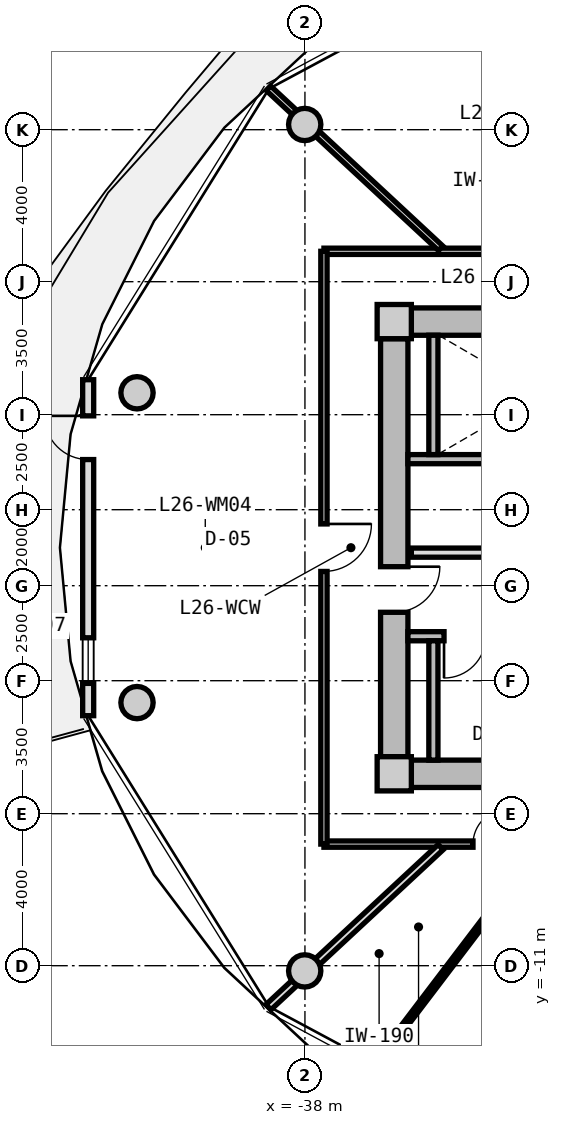
"""IFC4 building model, lengths in metres.
Left out: names, types, materials, properties, quantities, classifications, styles, units other than length and angle.
Written with IfcOpenShell. Run it as: python <this file> out.ifc"""

import sys

from ifc_helpers import new_model, si_unit, direction, frame, frame_2d, origin, origin_2d, place, context, subcontext, project, spatial, rectangle, circle, extrude, source, transform, mapped, element, fill, save


model = new_model("IFC4")
c1 = context("Model", 3, precision=1e-05, world=origin(), true_north=direction((0.0, 1.0)))
c2 = subcontext(c1, "Body", "Model", "MODEL_VIEW")
j1 = project(units=[si_unit("LENGTHUNIT", "METRE"), si_unit("PLANEANGLEUNIT", "RADIAN")], contexts=[c1])
p1 = place(None, origin())
s1 = spatial("IfcSite", under=j1, at=p1, CompositionType="ELEMENT")
p2 = place(p1, origin())
s2 = spatial("IfcBuilding", under=s1, at=p2, CompositionType="ELEMENT")
p3 = place(p2, frame((0.0, 0.0, 87.1)))
s3 = spatial("IfcBuildingStorey", under=s2, at=p3, CompositionType="ELEMENT", Elevation=87.1)
m1 = source(origin(), c2, "Body", "SweptSolid", [
    extrude(rectangle(XDim=0.9, YDim=0.9, at=origin_2d()), origin(), (0.0, 0.0, 1.0), 3.05),
])
for number, where, z_axis, x_axis in (
    (1, (-35.65, -5.95, 0.0), (0.0, 0.0, 1.0), (1.0, 0.0, 0.0)),
    (2, (-35.65, 5.95, 0.0), (0.0, 0.0, 1.0), (1.0, 0.0, 0.0)),
):
    element("IfcColumn", number, at=place(p3, frame(where, z_axis=z_axis, x_axis=x_axis)), inside=s3, PredefinedType="COLUMN", context=c2, shape_type="MappedRepresentation", body=[
        mapped(m1, transform((0.0, 0.0, 0.0), x_axis=(1.0, 0.0, 0.0), y_axis=(0.0, 1.0, 0.0), z_axis=(0.0, 0.0, 1.0), scale=1.0)),
    ])
m2 = source(origin(), c2, "Body", "SweptSolid", [
    extrude(rectangle(XDim=14.4, YDim=0.72, at=frame_2d((7.2, 0.0))), origin(), (0.0, 0.0, 1.0), 2.79),
])
for number, where, z_axis, x_axis in (
    (3, (-35.2, 5.95, 0.0), (0.0, 0.0, 1.0), (1.0, 0.0, 0.0)),
    (4, (-20.8, -5.95, 0.0), (0.0, 0.0, 1.0), (-1.0, 0.0, 0.0)),
):
    element("IfcWall", number, at=place(p3, frame(where, z_axis=z_axis, x_axis=x_axis)), inside=s3, PredefinedType="SHEAR", context=c2, shape_type="MappedRepresentation", body=[
        mapped(m2, transform((0.0, 0.0, 0.0), x_axis=(1.0, 0.0, 0.0), y_axis=(0.0, 1.0, 0.0), z_axis=(0.0, 0.0, 1.0), scale=1.0)),
    ])
m3 = source(origin(), c2, "Body", "SweptSolid", [
    extrude(rectangle(XDim=11.0, YDim=0.72, at=frame_2d((5.5, 0.0))), origin(), (0.0, 0.0, 1.0), 2.79),
])
p4 = place(p3, frame((-35.65, -5.5, 0.0), z_axis=(0.0, 0.0, 1.0), x_axis=(0.0, 1.0, 0.0)))
e5 = element("IfcWall", 5, at=p4, inside=s3, PredefinedType="SHEAR", context=c2, shape_type="MappedRepresentation", body=[
    mapped(m3, transform((0.0, 0.0, 0.0), x_axis=(1.0, 0.0, 0.0), y_axis=(0.0, 1.0, 0.0), z_axis=(0.0, 0.0, 1.0), scale=1.0)),
])
p5 = place(p4, frame((3.8, 0.0, 0.0)))
e6 = element("IfcOpeningElement", 6, at=p5, cuts=e5, PredefinedType="OPENING", context=c2, shape_type="SweptSolid", body=[
    extrude(rectangle(XDim=1.2, YDim=2.15, at=frame_2d((0.6, 1.075))), frame((0.0, 0.37, 0.0), z_axis=(0.0, -1.0, 0.0), x_axis=(1.0, 0.0, 0.0)), (0.0, 0.0, 1.0), 0.74),
])
m4 = source(origin(), c2, "Body", "SweptSolid", [
    extrude(circle(Radius=0.425, at=origin_2d()), origin(), (0.0, 0.0, 1.0), 3.05),
])
for number, where, z_axis, x_axis in (
    (7, (-38.006, 11.137, 0.0), (0.0, 0.0, 1.0), (1.0, 0.0, 0.0)),
    (8, (-42.419, 4.076, 0.0), (0.0, 0.0, 1.0), (1.0, 0.0, 0.0)),
    (9, (-42.419, -4.076, 0.0), (0.0, 0.0, 1.0), (1.0, 0.0, 0.0)),
    (10, (-38.006, -11.137, 0.0), (0.0, 0.0, 1.0), (1.0, 0.0, 0.0)),
):
    element("IfcColumn", number, at=place(p3, frame(where, z_axis=z_axis, x_axis=x_axis)), inside=s3, PredefinedType="COLUMN", context=c2, shape_type="MappedRepresentation", body=[
        mapped(m4, transform((0.0, 0.0, 0.0), x_axis=(1.0, 0.0, 0.0), y_axis=(0.0, 1.0, 0.0), z_axis=(0.0, 0.0, 1.0), scale=1.0)),
    ])
m5 = source(origin(), c2, "Body", "SweptSolid", [
    extrude(rectangle(XDim=8.841, YDim=0.29, at=frame_2d((4.421, 0.0))), origin(), (0.0, 0.0, 1.0), 2.79),
])
p6 = place(p3, frame((-43.704, -4.421, 0.0), z_axis=(0.0, 0.0, 1.0), x_axis=(0.0, 1.0, 0.0)))
e11 = element("IfcWall", 11, at=p6, inside=s3, PredefinedType="SOLIDWALL", context=c2, shape_type="MappedRepresentation", body=[
    mapped(m5, transform((0.0, 0.0, 0.0), x_axis=(1.0, 0.0, 0.0), y_axis=(0.0, 1.0, 0.0), z_axis=(0.0, 0.0, 1.0), scale=1.0)),
])
p7 = place(p6, frame((6.74, 0.0, 0.0)))
e12 = element("IfcOpeningElement", 12, at=p7, cuts=e11, PredefinedType="OPENING", context=c2, shape_type="SweptSolid", body=[
    extrude(rectangle(XDim=1.15, YDim=2.25, at=frame_2d((0.575, 1.125))), frame((0.0, 0.155, 0.0), z_axis=(0.0, -1.0, 0.0), x_axis=(1.0, 0.0, 0.0)), (0.0, 0.0, 1.0), 0.31),
])
p8 = place(p6, frame((0.85, 0.0, 0.85)))
e13 = element("IfcOpeningElement", 13, at=p8, cuts=e11, PredefinedType="OPENING", context=c2, shape_type="SweptSolid", body=[
    extrude(rectangle(XDim=1.2, YDim=1.5, at=frame_2d((0.6, 0.75))), frame((0.0, 0.155, 0.0), z_axis=(0.0, -1.0, 0.0), x_axis=(1.0, 0.0, 0.0)), (0.0, 0.0, 1.0), 0.31),
])
m6 = source(origin(), c2, "Body", "SweptSolid", [
    extrude(rectangle(XDim=7.83, YDim=0.24, at=frame_2d((3.915, 0.0))), origin(), (0.0, 0.0, 1.0), 2.79),
])
p9 = place(p3, frame((-35.29, 2.33, 0.0), z_axis=(0.0, 0.0, 1.0), x_axis=(1.0, 0.0, 0.0)))
e14 = element("IfcWall", 14, at=p9, inside=s3, PredefinedType="PARTITIONING", context=c2, shape_type="MappedRepresentation", body=[
    mapped(m6, transform((0.0, 0.0, 0.0), x_axis=(1.0, 0.0, 0.0), y_axis=(0.0, 1.0, 0.0), z_axis=(0.0, 0.0, 1.0), scale=1.0)),
])
m7 = source(origin(), c2, "Body", "SweptSolid", [
    extrude(rectangle(XDim=3.14, YDim=0.24, at=frame_2d((1.57, 0.0))), origin(), (0.0, 0.0, 1.0), 2.79),
])
p10 = place(p3, frame((-34.62, 2.45, 0.0), z_axis=(0.0, 0.0, 1.0), x_axis=(0.0, 1.0, 0.0)))
e15 = element("IfcWall", 15, at=p10, inside=s3, PredefinedType="PARTITIONING", context=c2, shape_type="MappedRepresentation", body=[
    mapped(m7, transform((0.0, 0.0, 0.0), x_axis=(1.0, 0.0, 0.0), y_axis=(0.0, 1.0, 0.0), z_axis=(0.0, 0.0, 1.0), scale=1.0)),
])
p11 = place(p3, frame((-35.29, -2.33, 0.0), z_axis=(0.0, 0.0, 1.0), x_axis=(1.0, 0.0, 0.0)))
e16 = element("IfcWall", 16, at=p11, inside=s3, PredefinedType="PARTITIONING", context=c2, shape_type="MappedRepresentation", body=[
    mapped(m6, transform((0.0, 0.0, 0.0), x_axis=(1.0, 0.0, 0.0), y_axis=(0.0, 1.0, 0.0), z_axis=(0.0, 0.0, 1.0), scale=1.0)),
])
p12 = place(p11, frame((0.95, 0.0, 0.0)))
e17 = element("IfcOpeningElement", 17, at=p12, cuts=e16, PredefinedType="OPENING", context=c2, shape_type="SweptSolid", body=[
    extrude(rectangle(XDim=1.1, YDim=2.15, at=frame_2d((0.55, 1.075))), frame((0.0, 0.13, 0.0), z_axis=(0.0, -1.0, 0.0), x_axis=(1.0, 0.0, 0.0)), (0.0, 0.0, 1.0), 0.26),
])
p13 = place(p3, frame((-34.62, -5.59, 0.0), z_axis=(0.0, 0.0, 1.0), x_axis=(0.0, 1.0, 0.0)))
e18 = element("IfcWall", 18, at=p13, inside=s3, PredefinedType="PARTITIONING", context=c2, shape_type="MappedRepresentation", body=[
    mapped(m7, transform((0.0, 0.0, 0.0), x_axis=(1.0, 0.0, 0.0), y_axis=(0.0, 1.0, 0.0), z_axis=(0.0, 0.0, 1.0), scale=1.0)),
])
m8 = source(origin(), c2, "Body", "SweptSolid", [
    extrude(rectangle(XDim=7.62, YDim=0.24, at=frame_2d((3.81, 0.0))), origin(), (0.0, 0.0, 1.0), 2.775),
])
p14 = place(p3, frame((-35.2, -0.13, 0.0), z_axis=(0.0, 0.0, 1.0), x_axis=(1.0, 0.0, 0.0)))
e19 = element("IfcWall", 19, at=p14, inside=s3, PredefinedType="PARTITIONING", context=c2, shape_type="MappedRepresentation", body=[
    mapped(m8, transform((0.0, 0.0, 0.0), x_axis=(1.0, 0.0, 0.0), y_axis=(0.0, 1.0, 0.0), z_axis=(0.0, 0.0, 1.0), scale=1.0)),
])
p15 = place(p14, frame((6.22, 0.0, 0.0)))
e20 = element("IfcOpeningElement", 20, at=p15, cuts=e19, PredefinedType="OPENING", context=c2, shape_type="SweptSolid", body=[
    extrude(rectangle(XDim=1.0, YDim=2.1, at=frame_2d((0.5, 1.05))), frame((0.0, 0.13, 0.0), z_axis=(0.0, -1.0, 0.0), x_axis=(1.0, 0.0, 0.0)), (0.0, 0.0, 1.0), 0.26),
])
p16 = place(p14, frame((2.4, 0.0, 0.0)))
e21 = element("IfcOpeningElement", 21, at=p16, cuts=e19, PredefinedType="OPENING", context=c2, shape_type="SweptSolid", body=[
    extrude(rectangle(XDim=1.0, YDim=2.1, at=frame_2d((0.5, 1.05))), frame((0.0, 0.13, 0.0), z_axis=(0.0, -1.0, 0.0), x_axis=(1.0, 0.0, 0.0)), (0.0, 0.0, 1.0), 0.26),
])
m9 = source(origin(), c2, "Body", "SweptSolid", [
    extrude(rectangle(XDim=8.6, YDim=0.165, at=frame_2d((4.3, 0.0))), origin(), (0.0, 0.0, 1.0), 2.775),
])
p17 = place(p3, frame((-37.5, 7.8, 0.0), z_axis=(0.0, 0.0, 1.0), x_axis=(1.0, 0.0, 0.0)))
e22 = element("IfcWall", 22, at=p17, inside=s3, PredefinedType="PARTITIONING", context=c2, shape_type="MappedRepresentation", body=[
    mapped(m9, transform((0.0, 0.0, 0.0), x_axis=(1.0, 0.0, 0.0), y_axis=(0.0, 1.0, 0.0), z_axis=(0.0, 0.0, 1.0), scale=1.0)),
])
m10 = source(origin(), c2, "Body", "SweptSolid", [
    extrude(rectangle(XDim=9.234, YDim=0.165, at=frame_2d((4.617, 0.0))), origin(), (0.0, 0.0, 1.0), 2.775),
])
p18 = place(p3, frame((-28.266, -7.8, 0.0), z_axis=(0.0, 0.0, 1.0), x_axis=(-1.0, 0.0, 0.0)))
e23 = element("IfcWall", 23, at=p18, inside=s3, PredefinedType="PARTITIONING", context=c2, shape_type="MappedRepresentation", body=[
    mapped(m10, transform((0.0, 0.0, 0.0), x_axis=(1.0, 0.0, 0.0), y_axis=(0.0, 1.0, 0.0), z_axis=(0.0, 0.0, 1.0), scale=1.0)),
])
p19 = place(p18, frame((4.392, 0.0, 0.0)))
e24 = element("IfcOpeningElement", 24, at=p19, cuts=e23, PredefinedType="OPENING", context=c2, shape_type="SweptSolid", body=[
    extrude(rectangle(XDim=0.92, YDim=2.1, at=frame_2d((0.46, 1.05))), frame((0.0, 0.093, 0.0), z_axis=(0.0, -1.0, 0.0), x_axis=(1.0, 0.0, 0.0)), (0.0, 0.0, 1.0), 0.185),
])
p20 = place(p18, frame((1.408, 0.0, 0.0)))
e25 = element("IfcOpeningElement", 25, at=p20, cuts=e23, PredefinedType="OPENING", context=c2, shape_type="SweptSolid", body=[
    extrude(rectangle(XDim=0.92, YDim=2.1, at=frame_2d((0.46, 1.05))), frame((0.0, 0.093, 0.0), z_axis=(0.0, -1.0, 0.0), x_axis=(1.0, 0.0, 0.0)), (0.0, 0.0, 1.0), 0.185),
])
m11 = source(origin(), c2, "Body", "SweptSolid", [
    extrude(rectangle(XDim=15.6, YDim=0.165, at=frame_2d((7.8, 0.0))), origin(), (0.0, 0.0, 1.0), 2.775),
])
p21 = place(p3, frame((-37.5, -7.8, 0.0), z_axis=(0.0, 0.0, 1.0), x_axis=(0.0, 1.0, 0.0)))
e26 = element("IfcWall", 26, at=p21, inside=s3, PredefinedType="PARTITIONING", context=c2, shape_type="MappedRepresentation", body=[
    mapped(m11, transform((0.0, 0.0, 0.0), x_axis=(1.0, 0.0, 0.0), y_axis=(0.0, 1.0, 0.0), z_axis=(0.0, 0.0, 1.0), scale=1.0)),
])
p22 = place(p21, frame((7.175, 0.0, 0.0)))
e27 = element("IfcOpeningElement", 27, at=p22, cuts=e26, PredefinedType="OPENING", context=c2, shape_type="SweptSolid", body=[
    extrude(rectangle(XDim=1.25, YDim=2.2, at=frame_2d((0.625, 1.1))), frame((0.0, 0.093, 0.0), z_axis=(0.0, -1.0, 0.0), x_axis=(1.0, 0.0, 0.0)), (0.0, 0.0, 1.0), 0.185),
])
m12 = source(origin(), c2, "Body", "SweptSolid", [
    extrude(rectangle(XDim=6.187, YDim=0.165, at=frame_2d((3.093, 0.0))), origin(), (0.0, 0.0, 1.0), 2.275),
])
p23 = place(p3, frame((-34.429, 7.88, 0.0), z_axis=(0.0, 0.0, 1.0), x_axis=(-0.732501077882, 0.680765870841, 0.0)))
e28 = element("IfcWall", 28, at=p23, inside=s3, PredefinedType="PARTITIONING", context=c2, shape_type="MappedRepresentation", body=[
    mapped(m12, transform((0.0, 0.0, 0.0), x_axis=(1.0, 0.0, 0.0), y_axis=(0.0, 1.0, 0.0), z_axis=(0.0, 0.0, 1.0), scale=1.0)),
])
m13 = source(origin(), c2, "Body", "SweptSolid", [
    extrude(rectangle(XDim=6.187, YDim=0.19, at=frame_2d((3.093, 0.0))), origin(), (0.0, 0.0, 1.0), 2.275),
])
p24 = place(p3, frame((-34.429, -7.88, 0.0), z_axis=(0.0, 0.0, 1.0), x_axis=(-0.732501077882, -0.680765870841, 0.0)))
e29 = element("IfcWall", 29, at=p24, inside=s3, PredefinedType="PARTITIONING", context=c2, shape_type="MappedRepresentation", body=[
    mapped(m13, transform((0.0, 0.0, 0.0), x_axis=(1.0, 0.0, 0.0), y_axis=(0.0, 1.0, 0.0), z_axis=(0.0, 0.0, 1.0), scale=1.0)),
])
m14 = source(origin(), c2, "Body", "SweptSolid", [
    extrude(rectangle(XDim=7.243, YDim=0.14, at=frame_2d((3.621, 0.0))), origin(), (0.0, 0.0, 1.0), 2.775),
])
p25 = place(p3, frame((-31.774, -7.83, 0.0), z_axis=(0.0, 0.0, 1.0), x_axis=(-0.605111472002, -0.796140757939, 0.0)))
e30 = element("IfcWall", 30, at=p25, inside=s3, PredefinedType="PARTITIONING", context=c2, shape_type="MappedRepresentation", body=[
    mapped(m14, transform((0.0, 0.0, 0.0), x_axis=(1.0, 0.0, 0.0), y_axis=(0.0, 1.0, 0.0), z_axis=(0.0, 0.0, 1.0), scale=1.0)),
])
m15 = source(origin(), c2, "Body", "SweptSolid", [
    extrude(rectangle(XDim=1.15, YDim=2.25, at=frame_2d((0.575, 1.125))), frame((0.0, 0.025, 0.0), z_axis=(0.0, -1.0, 0.0), x_axis=(1.0, 0.0, 0.0)), (0.0, 0.0, 1.0), 0.05),
])
p26 = place(p7, origin())
e31 = element("IfcDoor", 31, at=p26, inside=s3, OperationType="SINGLE_SWING_RIGHT", PredefinedType="DOOR", context=c2, shape_type="MappedRepresentation", body=[
    mapped(m15, transform((0.0, 0.0, 0.0), x_axis=(1.0, 0.0, 0.0), y_axis=(0.0, 1.0, 0.0), z_axis=(0.0, 0.0, 1.0), scale=1.0)),
])
fill(e12, e31)
m16 = source(origin(), c2, "Body", "SweptSolid", [
    extrude(rectangle(XDim=1.2, YDim=1.5, at=frame_2d((0.6, 0.75))), frame((0.0, 0.03, 0.0), z_axis=(0.0, -1.0, 0.0), x_axis=(1.0, 0.0, 0.0)), (0.0, 0.0, 1.0), 0.06),
])
p27 = place(p8, origin())
e32 = element("IfcWindow", 32, at=p27, inside=s3, PartitioningType="SINGLE_PANEL", PredefinedType="WINDOW", context=c2, shape_type="MappedRepresentation", body=[
    mapped(m16, transform((0.0, 0.0, 0.0), x_axis=(1.0, 0.0, 0.0), y_axis=(0.0, 1.0, 0.0), z_axis=(0.0, 0.0, 1.0), scale=1.0)),
])
fill(e13, e32)
m17 = source(origin(), c2, "Body", "SweptSolid", [
    extrude(rectangle(XDim=1.1, YDim=2.15, at=frame_2d((0.55, 1.075))), frame((0.0, 0.025, 0.0), z_axis=(0.0, -1.0, 0.0), x_axis=(1.0, 0.0, 0.0)), (0.0, 0.0, 1.0), 0.05),
])
p28 = place(p12, frame((1.1, 0.0, 0.0), z_axis=(0.0, 0.0, 1.0), x_axis=(-1.0, 0.0, 0.0)))
e33 = element("IfcDoor", 33, at=p28, inside=s3, OperationType="SINGLE_SWING_RIGHT", PredefinedType="DOOR", context=c2, shape_type="MappedRepresentation", body=[
    mapped(m17, transform((0.0, 0.0, 0.0), x_axis=(1.0, 0.0, 0.0), y_axis=(0.0, 1.0, 0.0), z_axis=(0.0, 0.0, 1.0), scale=1.0)),
])
fill(e17, e33)
m18 = source(origin(), c2, "Body", "SweptSolid", [
    extrude(rectangle(XDim=1.2, YDim=2.15, at=frame_2d((0.6, 1.075))), frame((0.0, 0.025, 0.0), z_axis=(0.0, -1.0, 0.0), x_axis=(1.0, 0.0, 0.0)), (0.0, 0.0, 1.0), 0.05),
])
p29 = place(p5, frame((1.2, 0.0, 0.0), z_axis=(0.0, 0.0, 1.0), x_axis=(-1.0, 0.0, 0.0)))
e34 = element("IfcDoor", 34, at=p29, inside=s3, OperationType="SINGLE_SWING_LEFT", PredefinedType="DOOR", context=c2, shape_type="MappedRepresentation", body=[
    mapped(m18, transform((0.0, 0.0, 0.0), x_axis=(1.0, 0.0, 0.0), y_axis=(0.0, 1.0, 0.0), z_axis=(0.0, 0.0, 1.0), scale=1.0)),
])
fill(e6, e34)
m19 = source(origin(), c2, "Body", "SweptSolid", [
    extrude(rectangle(XDim=1.25, YDim=2.2, at=frame_2d((0.625, 1.1))), frame((0.0, 0.025, 0.0), z_axis=(0.0, -1.0, 0.0), x_axis=(1.0, 0.0, 0.0)), (0.0, 0.0, 1.0), 0.05),
])
p30 = place(p22, frame((1.25, 0.0, 0.0), z_axis=(0.0, 0.0, 1.0), x_axis=(-1.0, 0.0, 0.0)))
e35 = element("IfcDoor", 35, at=p30, inside=s3, OperationType="SINGLE_SWING_LEFT", PredefinedType="DOOR", context=c2, shape_type="MappedRepresentation", body=[
    mapped(m19, transform((0.0, 0.0, 0.0), x_axis=(1.0, 0.0, 0.0), y_axis=(0.0, 1.0, 0.0), z_axis=(0.0, 0.0, 1.0), scale=1.0)),
])
fill(e27, e35)
m20 = source(origin(), c2, "Body", "SweptSolid", [
    extrude(rectangle(XDim=0.92, YDim=2.1, at=frame_2d((0.46, 1.05))), frame((0.0, 0.025, 0.0), z_axis=(0.0, -1.0, 0.0), x_axis=(1.0, 0.0, 0.0)), (0.0, 0.0, 1.0), 0.05),
])
p31 = place(p19, frame((0.92, 0.0, 0.0), z_axis=(0.0, 0.0, 1.0), x_axis=(-1.0, 0.0, 0.0)))
e36 = element("IfcDoor", 36, at=p31, inside=s3, OperationType="SINGLE_SWING_RIGHT", PredefinedType="DOOR", context=c2, shape_type="MappedRepresentation", body=[
    mapped(m20, transform((0.0, 0.0, 0.0), x_axis=(1.0, 0.0, 0.0), y_axis=(0.0, 1.0, 0.0), z_axis=(0.0, 0.0, 1.0), scale=1.0)),
])
fill(e24, e36)
save(model, sys.argv[1])
